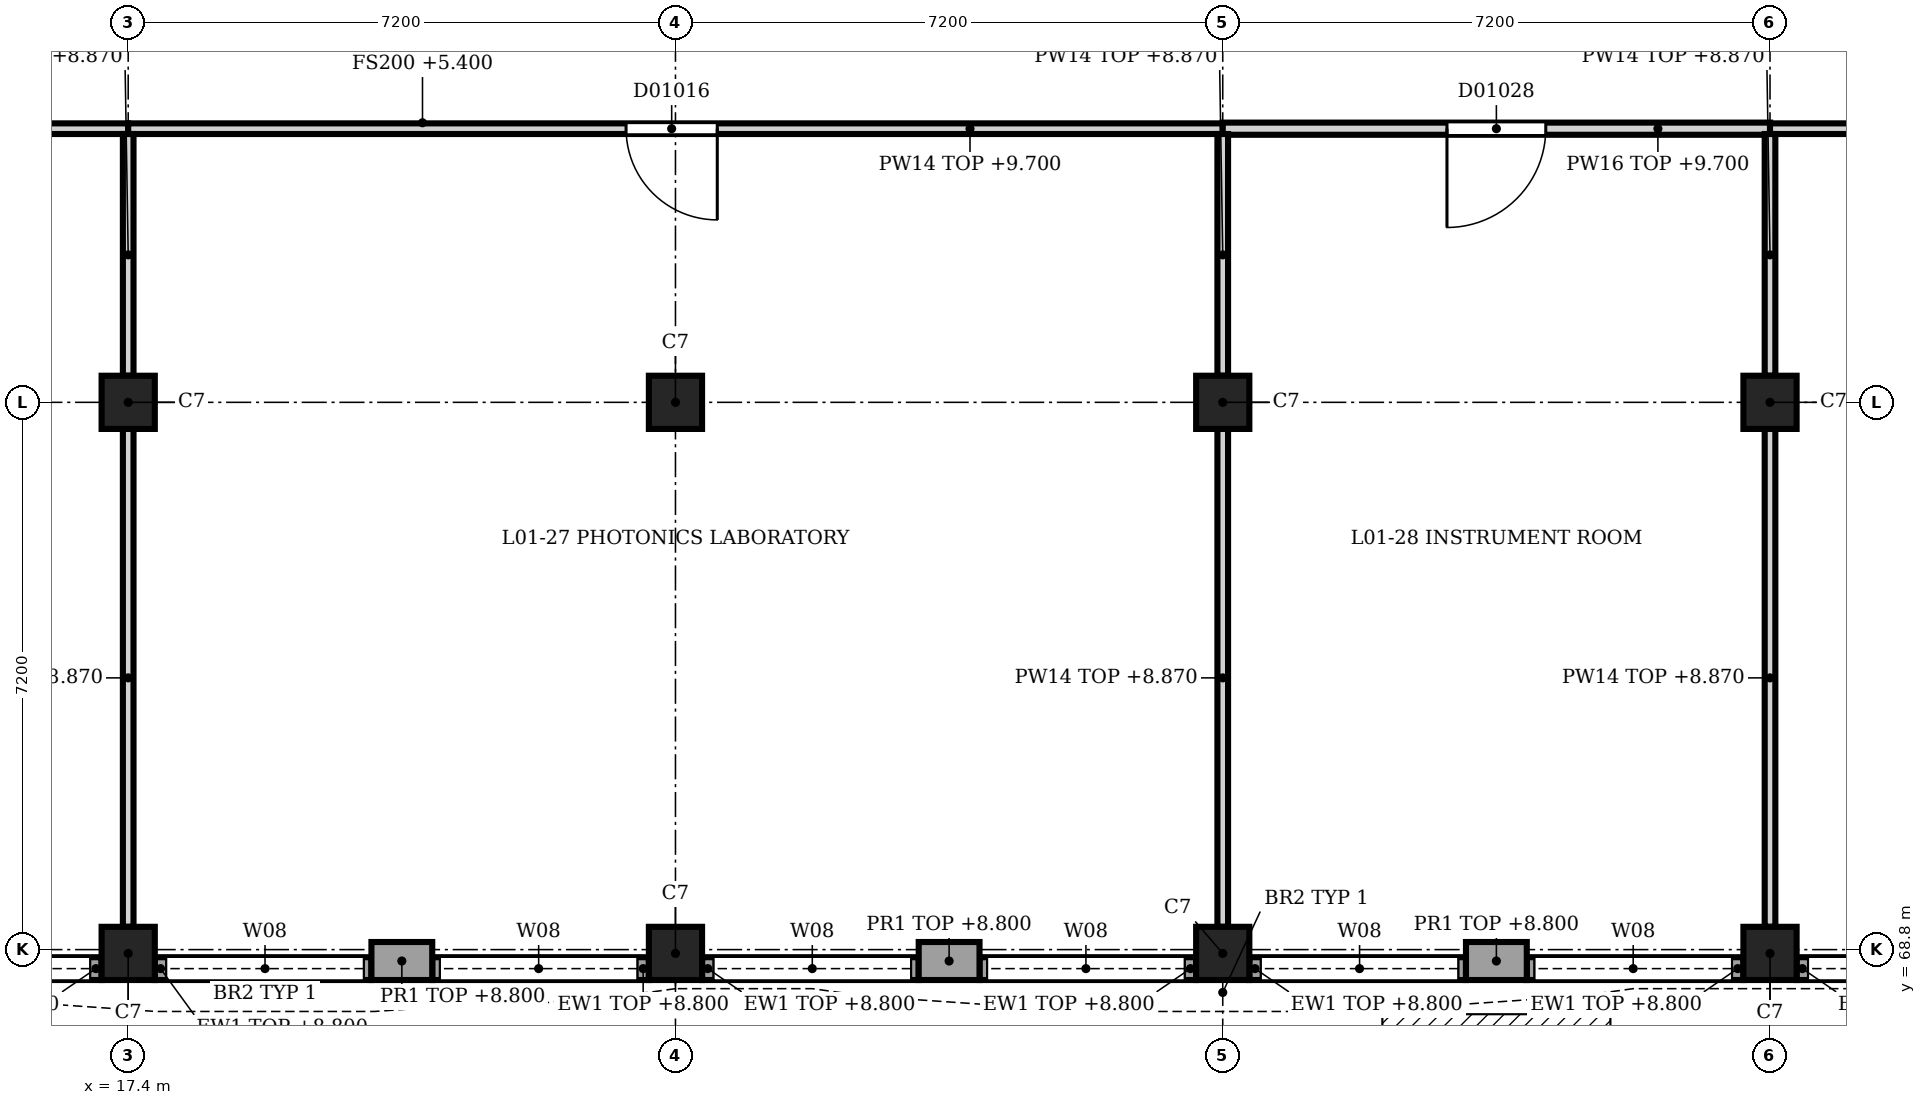
"""IFC4 building model, lengths in metres.
Left out: names, types, materials, properties, quantities, classifications, styles, units other than length and angle.
Written with IfcOpenShell. Run it as: python <this file> out.ifc"""

import sys

from ifc_helpers import new_model, si_unit, direction, frame, frame_2d, origin, origin_2d, place, context, subcontext, project, spatial, rectangle, extrude, element, fill, save


model = new_model("IFC4")
c1 = context("Model", 3, precision=1e-05, world=origin(), true_north=direction((0.0, 1.0)))
c2 = subcontext(c1, "Body", "Model", "MODEL_VIEW")
j1 = project(units=[si_unit("LENGTHUNIT", "METRE"), si_unit("PLANEANGLEUNIT", "RADIAN")], contexts=[c1])
p1 = place(None, origin())
s1 = spatial("IfcSite", under=j1, at=p1, CompositionType="ELEMENT")
p2 = place(p1, origin())
s2 = spatial("IfcBuilding", under=s1, at=p2, CompositionType="ELEMENT")
p3 = place(p2, frame((0.0, 0.0, 5.4)))
s3 = spatial("IfcBuildingStorey", under=s2, at=p3, CompositionType="ELEMENT", Elevation=5.4)
for number, where, z_axis, x_axis in (
    (1, (17.4, 68.75, 0.0), (0.0, 0.0, 1.0), (1.0, 0.0, 0.0)),
    (2, (17.4, 76.0, 0.0), (0.0, 0.0, 1.0), (1.0, 0.0, 0.0)),
    (3, (24.6, 68.75, 0.0), (0.0, 0.0, 1.0), (1.0, 0.0, 0.0)),
    (4, (24.6, 76.0, 0.0), (0.0, 0.0, 1.0), (1.0, 0.0, 0.0)),
    (5, (31.8, 68.75, 0.0), (0.0, 0.0, 1.0), (1.0, 0.0, 0.0)),
    (6, (31.8, 76.0, 0.0), (0.0, 0.0, 1.0), (1.0, 0.0, 0.0)),
    (7, (39.0, 68.75, 0.0), (0.0, 0.0, 1.0), (1.0, 0.0, 0.0)),
    (8, (39.0, 76.0, 0.0), (0.0, 0.0, 1.0), (1.0, 0.0, 0.0)),
):
    element("IfcColumn", number, at=place(p3, frame(where, z_axis=z_axis, x_axis=x_axis)), inside=s3, PredefinedType="COLUMN", context=c2, shape_type="SweptSolid", body=[
        extrude(rectangle(XDim=0.7, YDim=0.7, at=origin_2d()), origin(), (0.0, 0.0, 1.0), 4.5),
    ])
for number, where, z_axis, x_axis in (
    (9, (35.8, 68.65, 0.0), (0.0, 0.0, 1.0), (-1.0, 0.0, 0.0)),
    (10, (28.6, 68.65, 0.0), (0.0, 0.0, 1.0), (-1.0, 0.0, 0.0)),
):
    element("IfcWall", number, at=place(p3, frame(where, z_axis=z_axis, x_axis=x_axis)), inside=s3, PredefinedType="SOLIDWALL", context=c2, shape_type="SweptSolid", body=[
        extrude(rectangle(XDim=0.8, YDim=0.5, at=frame_2d((0.4, 0.0))), origin(), (0.0, 0.0, 1.0), 3.4),
    ])
p4 = place(p3, frame((21.4, 68.65, 0.0), z_axis=(0.0, 0.0, 1.0), x_axis=(-1.0, 0.0, 0.0)))
e11 = element("IfcWall", 11, at=p4, inside=s3, PredefinedType="SOLIDWALL", context=c2, shape_type="SweptSolid", body=[
    extrude(rectangle(XDim=0.8, YDim=0.5, at=frame_2d((0.4, 0.0))), origin(), (0.0, 0.0, 1.0), 3.4),
])
p5 = place(p3, frame((42.2, 68.55, 0.0), z_axis=(0.0, 0.0, 1.0), x_axis=(-1.0, 0.0, 0.0)))
e12 = element("IfcWall", 12, at=p5, inside=s3, PredefinedType="SOLIDWALL", context=c2, shape_type="SweptSolid", body=[
    extrude(rectangle(XDim=2.85, YDim=0.3, at=frame_2d((1.425, 0.0))), origin(), (0.0, 0.0, 1.0), 3.4),
])
p6 = place(p5, frame((0.1, 0.0, 1.2)))
e13 = element("IfcOpeningElement", 13, at=p6, cuts=e12, PredefinedType="OPENING", context=c2, shape_type="SweptSolid", body=[
    extrude(rectangle(XDim=2.6, YDim=2.1, at=frame_2d((1.3, 1.05))), frame((0.0, 0.16, 0.0), z_axis=(0.0, -1.0, 0.0), x_axis=(1.0, 0.0, 0.0)), (0.0, 0.0, 1.0), 0.32),
])
p7 = place(p3, frame((38.65, 68.55, 0.0), z_axis=(0.0, 0.0, 1.0), x_axis=(-1.0, 0.0, 0.0)))
e14 = element("IfcWall", 14, at=p7, inside=s3, PredefinedType="SOLIDWALL", context=c2, shape_type="SweptSolid", body=[
    extrude(rectangle(XDim=2.85, YDim=0.3, at=frame_2d((1.425, 0.0))), origin(), (0.0, 0.0, 1.0), 3.4),
])
p8 = place(p7, frame((0.15, 0.0, 1.2)))
e15 = element("IfcOpeningElement", 15, at=p8, cuts=e14, PredefinedType="OPENING", context=c2, shape_type="SweptSolid", body=[
    extrude(rectangle(XDim=2.6, YDim=2.1, at=frame_2d((1.3, 1.05))), frame((0.0, 0.16, 0.0), z_axis=(0.0, -1.0, 0.0), x_axis=(1.0, 0.0, 0.0)), (0.0, 0.0, 1.0), 0.32),
])
p9 = place(p3, frame((35.0, 68.55, 0.0), z_axis=(0.0, 0.0, 1.0), x_axis=(-1.0, 0.0, 0.0)))
e16 = element("IfcWall", 16, at=p9, inside=s3, PredefinedType="SOLIDWALL", context=c2, shape_type="SweptSolid", body=[
    extrude(rectangle(XDim=2.85, YDim=0.3, at=frame_2d((1.425, 0.0))), origin(), (0.0, 0.0, 1.0), 3.4),
])
p10 = place(p9, frame((0.1, 0.0, 1.2)))
e17 = element("IfcOpeningElement", 17, at=p10, cuts=e16, PredefinedType="OPENING", context=c2, shape_type="SweptSolid", body=[
    extrude(rectangle(XDim=2.6, YDim=2.1, at=frame_2d((1.3, 1.05))), frame((0.0, 0.16, 0.0), z_axis=(0.0, -1.0, 0.0), x_axis=(1.0, 0.0, 0.0)), (0.0, 0.0, 1.0), 0.32),
])
p11 = place(p3, frame((31.45, 68.55, 0.0), z_axis=(0.0, 0.0, 1.0), x_axis=(-1.0, 0.0, 0.0)))
e18 = element("IfcWall", 18, at=p11, inside=s3, PredefinedType="SOLIDWALL", context=c2, shape_type="SweptSolid", body=[
    extrude(rectangle(XDim=2.85, YDim=0.3, at=frame_2d((1.425, 0.0))), origin(), (0.0, 0.0, 1.0), 3.4),
])
p12 = place(p11, frame((0.15, 0.0, 1.2)))
e19 = element("IfcOpeningElement", 19, at=p12, cuts=e18, PredefinedType="OPENING", context=c2, shape_type="SweptSolid", body=[
    extrude(rectangle(XDim=2.6, YDim=2.1, at=frame_2d((1.3, 1.05))), frame((0.0, 0.16, 0.0), z_axis=(0.0, -1.0, 0.0), x_axis=(1.0, 0.0, 0.0)), (0.0, 0.0, 1.0), 0.32),
])
p13 = place(p3, frame((27.8, 68.55, 0.0), z_axis=(0.0, 0.0, 1.0), x_axis=(-1.0, 0.0, 0.0)))
e20 = element("IfcWall", 20, at=p13, inside=s3, PredefinedType="SOLIDWALL", context=c2, shape_type="SweptSolid", body=[
    extrude(rectangle(XDim=2.85, YDim=0.3, at=frame_2d((1.425, 0.0))), origin(), (0.0, 0.0, 1.0), 3.4),
])
p14 = place(p13, frame((0.1, 0.0, 1.2)))
e21 = element("IfcOpeningElement", 21, at=p14, cuts=e20, PredefinedType="OPENING", context=c2, shape_type="SweptSolid", body=[
    extrude(rectangle(XDim=2.6, YDim=2.1, at=frame_2d((1.3, 1.05))), frame((0.0, 0.16, 0.0), z_axis=(0.0, -1.0, 0.0), x_axis=(1.0, 0.0, 0.0)), (0.0, 0.0, 1.0), 0.32),
])
p15 = place(p3, frame((24.25, 68.55, 0.0), z_axis=(0.0, 0.0, 1.0), x_axis=(-1.0, 0.0, 0.0)))
e22 = element("IfcWall", 22, at=p15, inside=s3, PredefinedType="SOLIDWALL", context=c2, shape_type="SweptSolid", body=[
    extrude(rectangle(XDim=2.85, YDim=0.3, at=frame_2d((1.425, 0.0))), origin(), (0.0, 0.0, 1.0), 3.4),
])
p16 = place(p15, frame((0.15, 0.0, 1.2)))
e23 = element("IfcOpeningElement", 23, at=p16, cuts=e22, PredefinedType="OPENING", context=c2, shape_type="SweptSolid", body=[
    extrude(rectangle(XDim=2.6, YDim=2.1, at=frame_2d((1.3, 1.05))), frame((0.0, 0.16, 0.0), z_axis=(0.0, -1.0, 0.0), x_axis=(1.0, 0.0, 0.0)), (0.0, 0.0, 1.0), 0.32),
])
p17 = place(p3, frame((20.6, 68.55, 0.0), z_axis=(0.0, 0.0, 1.0), x_axis=(-1.0, 0.0, 0.0)))
e24 = element("IfcWall", 24, at=p17, inside=s3, PredefinedType="SOLIDWALL", context=c2, shape_type="SweptSolid", body=[
    extrude(rectangle(XDim=2.85, YDim=0.3, at=frame_2d((1.425, 0.0))), origin(), (0.0, 0.0, 1.0), 3.4),
])
p18 = place(p17, frame((0.1, 0.0, 1.2)))
e25 = element("IfcOpeningElement", 25, at=p18, cuts=e24, PredefinedType="OPENING", context=c2, shape_type="SweptSolid", body=[
    extrude(rectangle(XDim=2.6, YDim=2.1, at=frame_2d((1.3, 1.05))), frame((0.0, 0.16, 0.0), z_axis=(0.0, -1.0, 0.0), x_axis=(1.0, 0.0, 0.0)), (0.0, 0.0, 1.0), 0.32),
])
p19 = place(p3, frame((17.05, 68.55, 0.0), z_axis=(0.0, 0.0, 1.0), x_axis=(-1.0, 0.0, 0.0)))
e26 = element("IfcWall", 26, at=p19, inside=s3, PredefinedType="SOLIDWALL", context=c2, shape_type="SweptSolid", body=[
    extrude(rectangle(XDim=2.85, YDim=0.3, at=frame_2d((1.425, 0.0))), origin(), (0.0, 0.0, 1.0), 3.4),
])
p20 = place(p19, frame((0.15, 0.0, 1.2)))
e27 = element("IfcOpeningElement", 27, at=p20, cuts=e26, PredefinedType="OPENING", context=c2, shape_type="SweptSolid", body=[
    extrude(rectangle(XDim=2.6, YDim=2.1, at=frame_2d((1.3, 1.05))), frame((0.0, 0.16, 0.0), z_axis=(0.0, -1.0, 0.0), x_axis=(1.0, 0.0, 0.0)), (0.0, 0.0, 1.0), 0.32),
])
p21 = place(p3, frame((17.4, 79.6, 0.0), z_axis=(0.0, 0.0, 1.0), x_axis=(-1.0, 0.0, 0.0)))
e28 = element("IfcWall", 28, at=p21, inside=s3, PredefinedType="PARTITIONING", context=c2, shape_type="SweptSolid", body=[
    extrude(rectangle(XDim=14.3, YDim=0.14, at=frame_2d((7.15, 0.0))), origin(), (0.0, 0.0, 1.0), 4.3),
])
p22 = place(p21, frame((6.65, 0.0, 0.0)))
e29 = element("IfcOpeningElement", 29, at=p22, cuts=e28, PredefinedType="OPENING", context=c2, shape_type="SweptSolid", body=[
    extrude(rectangle(XDim=1.2, YDim=2.1, at=frame_2d((0.6, 1.05))), frame((0.0, 0.08, 0.0), z_axis=(0.0, -1.0, 0.0), x_axis=(1.0, 0.0, 0.0)), (0.0, 0.0, 1.0), 0.16),
])
p23 = place(p3, frame((31.8, 79.6, 0.0), z_axis=(0.0, 0.0, 1.0), x_axis=(-1.0, 0.0, 0.0)))
e30 = element("IfcWall", 30, at=p23, inside=s3, PredefinedType="PARTITIONING", context=c2, shape_type="SweptSolid", body=[
    extrude(rectangle(XDim=14.4, YDim=0.14, at=frame_2d((7.2, 0.0))), origin(), (0.0, 0.0, 1.0), 4.3),
])
p24 = place(p23, frame((6.65, 0.0, 0.0)))
e31 = element("IfcOpeningElement", 31, at=p24, cuts=e30, PredefinedType="OPENING", context=c2, shape_type="SweptSolid", body=[
    extrude(rectangle(XDim=1.2, YDim=2.1, at=frame_2d((0.6, 1.05))), frame((0.0, 0.08, 0.0), z_axis=(0.0, -1.0, 0.0), x_axis=(1.0, 0.0, 0.0)), (0.0, 0.0, 1.0), 0.16),
])
p25 = place(p3, frame((39.0, 79.6, 0.0), z_axis=(0.0, 0.0, 1.0), x_axis=(-1.0, 0.0, 0.0)))
e32 = element("IfcWall", 32, at=p25, inside=s3, PredefinedType="PARTITIONING", context=c2, shape_type="SweptSolid", body=[
    extrude(rectangle(XDim=7.2, YDim=0.16, at=frame_2d((3.6, 0.0))), origin(), (0.0, 0.0, 1.0), 4.3),
])
p26 = place(p25, frame((2.95, 0.0, 0.0)))
e33 = element("IfcOpeningElement", 33, at=p26, cuts=e32, PredefinedType="OPENING", context=c2, shape_type="SweptSolid", body=[
    extrude(rectangle(XDim=1.3, YDim=2.2, at=frame_2d((0.65, 1.1))), frame((0.0, 0.09, 0.0), z_axis=(0.0, -1.0, 0.0), x_axis=(1.0, 0.0, 0.0)), (0.0, 0.0, 1.0), 0.18),
])
p27 = place(p3, frame((57.0, 79.6, 0.0), z_axis=(0.0, 0.0, 1.0), x_axis=(-1.0, 0.0, 0.0)))
e34 = element("IfcWall", 34, at=p27, inside=s3, PredefinedType="PARTITIONING", context=c2, shape_type="SweptSolid", body=[
    extrude(rectangle(XDim=18.0, YDim=0.14, at=frame_2d((9.0, 0.0))), origin(), (0.0, 0.0, 1.0), 4.3),
])
p28 = place(p27, frame((8.45, 0.0, 0.0)))
e35 = element("IfcOpeningElement", 35, at=p28, cuts=e34, PredefinedType="OPENING", context=c2, shape_type="SweptSolid", body=[
    extrude(rectangle(XDim=1.1, YDim=2.2, at=frame_2d((0.55, 1.1))), frame((0.0, 0.08, 0.0), z_axis=(0.0, -1.0, 0.0), x_axis=(1.0, 0.0, 0.0)), (0.0, 0.0, 1.0), 0.16),
])
p29 = place(p3, frame((17.4, 69.1, 0.0), z_axis=(0.0, 0.0, 1.0), x_axis=(0.0, 1.0, 0.0)))
e36 = element("IfcWall", 36, at=p29, inside=s3, PredefinedType="PARTITIONING", context=c2, shape_type="SweptSolid", body=[
    extrude(rectangle(XDim=6.55, YDim=0.14, at=frame_2d((3.275, 0.0))), origin(), (0.0, 0.0, 1.0), 3.47),
])
p30 = place(p3, frame((17.4, 76.35, 0.0), z_axis=(0.0, 0.0, 1.0), x_axis=(0.0, 1.0, 0.0)))
e37 = element("IfcWall", 37, at=p30, inside=s3, PredefinedType="PARTITIONING", context=c2, shape_type="SweptSolid", body=[
    extrude(rectangle(XDim=3.18, YDim=0.14, at=frame_2d((1.59, 0.0))), origin(), (0.0, 0.0, 1.0), 3.47),
])
p31 = place(p3, frame((31.8, 69.1, 0.0), z_axis=(0.0, 0.0, 1.0), x_axis=(0.0, 1.0, 0.0)))
e38 = element("IfcWall", 38, at=p31, inside=s3, PredefinedType="PARTITIONING", context=c2, shape_type="SweptSolid", body=[
    extrude(rectangle(XDim=6.55, YDim=0.14, at=frame_2d((3.275, 0.0))), origin(), (0.0, 0.0, 1.0), 3.47),
])
p32 = place(p3, frame((31.8, 76.35, 0.0), z_axis=(0.0, 0.0, 1.0), x_axis=(0.0, 1.0, 0.0)))
e39 = element("IfcWall", 39, at=p32, inside=s3, PredefinedType="PARTITIONING", context=c2, shape_type="SweptSolid", body=[
    extrude(rectangle(XDim=3.18, YDim=0.14, at=frame_2d((1.59, 0.0))), origin(), (0.0, 0.0, 1.0), 3.47),
])
p33 = place(p3, frame((39.0, 69.1, 0.0), z_axis=(0.0, 0.0, 1.0), x_axis=(0.0, 1.0, 0.0)))
e40 = element("IfcWall", 40, at=p33, inside=s3, PredefinedType="PARTITIONING", context=c2, shape_type="SweptSolid", body=[
    extrude(rectangle(XDim=6.55, YDim=0.14, at=frame_2d((3.275, 0.0))), origin(), (0.0, 0.0, 1.0), 3.47),
])
p34 = place(p3, frame((39.0, 76.35, 0.0), z_axis=(0.0, 0.0, 1.0), x_axis=(0.0, 1.0, 0.0)))
e41 = element("IfcWall", 41, at=p34, inside=s3, PredefinedType="PARTITIONING", context=c2, shape_type="SweptSolid", body=[
    extrude(rectangle(XDim=3.18, YDim=0.14, at=frame_2d((1.59, 0.0))), origin(), (0.0, 0.0, 1.0), 3.47),
])
p35 = place(p6, origin())
e42 = element("IfcWindow", 42, at=p35, inside=s3, PartitioningType="SINGLE_PANEL", PredefinedType="WINDOW", context=c2, shape_type="SweptSolid", body=[
    extrude(rectangle(XDim=2.6, YDim=2.1, at=frame_2d((1.3, 1.05))), frame((0.0, 0.03, 0.0), z_axis=(0.0, -1.0, 0.0), x_axis=(1.0, 0.0, 0.0)), (0.0, 0.0, 1.0), 0.06),
])
fill(e13, e42)
p36 = place(p8, origin())
e43 = element("IfcWindow", 43, at=p36, inside=s3, PartitioningType="SINGLE_PANEL", PredefinedType="WINDOW", context=c2, shape_type="SweptSolid", body=[
    extrude(rectangle(XDim=2.6, YDim=2.1, at=frame_2d((1.3, 1.05))), frame((0.0, 0.03, 0.0), z_axis=(0.0, -1.0, 0.0), x_axis=(1.0, 0.0, 0.0)), (0.0, 0.0, 1.0), 0.06),
])
fill(e15, e43)
p37 = place(p10, origin())
e44 = element("IfcWindow", 44, at=p37, inside=s3, PartitioningType="SINGLE_PANEL", PredefinedType="WINDOW", context=c2, shape_type="SweptSolid", body=[
    extrude(rectangle(XDim=2.6, YDim=2.1, at=frame_2d((1.3, 1.05))), frame((0.0, 0.03, 0.0), z_axis=(0.0, -1.0, 0.0), x_axis=(1.0, 0.0, 0.0)), (0.0, 0.0, 1.0), 0.06),
])
fill(e17, e44)
p38 = place(p12, origin())
e45 = element("IfcWindow", 45, at=p38, inside=s3, PartitioningType="SINGLE_PANEL", PredefinedType="WINDOW", context=c2, shape_type="SweptSolid", body=[
    extrude(rectangle(XDim=2.6, YDim=2.1, at=frame_2d((1.3, 1.05))), frame((0.0, 0.03, 0.0), z_axis=(0.0, -1.0, 0.0), x_axis=(1.0, 0.0, 0.0)), (0.0, 0.0, 1.0), 0.06),
])
fill(e19, e45)
p39 = place(p14, origin())
e46 = element("IfcWindow", 46, at=p39, inside=s3, PartitioningType="SINGLE_PANEL", PredefinedType="WINDOW", context=c2, shape_type="SweptSolid", body=[
    extrude(rectangle(XDim=2.6, YDim=2.1, at=frame_2d((1.3, 1.05))), frame((0.0, 0.03, 0.0), z_axis=(0.0, -1.0, 0.0), x_axis=(1.0, 0.0, 0.0)), (0.0, 0.0, 1.0), 0.06),
])
fill(e21, e46)
p40 = place(p16, origin())
e47 = element("IfcWindow", 47, at=p40, inside=s3, PartitioningType="SINGLE_PANEL", PredefinedType="WINDOW", context=c2, shape_type="SweptSolid", body=[
    extrude(rectangle(XDim=2.6, YDim=2.1, at=frame_2d((1.3, 1.05))), frame((0.0, 0.03, 0.0), z_axis=(0.0, -1.0, 0.0), x_axis=(1.0, 0.0, 0.0)), (0.0, 0.0, 1.0), 0.06),
])
fill(e23, e47)
p41 = place(p18, origin())
e48 = element("IfcWindow", 48, at=p41, inside=s3, PartitioningType="SINGLE_PANEL", PredefinedType="WINDOW", context=c2, shape_type="SweptSolid", body=[
    extrude(rectangle(XDim=2.6, YDim=2.1, at=frame_2d((1.3, 1.05))), frame((0.0, 0.03, 0.0), z_axis=(0.0, -1.0, 0.0), x_axis=(1.0, 0.0, 0.0)), (0.0, 0.0, 1.0), 0.06),
])
fill(e25, e48)
p42 = place(p20, origin())
e49 = element("IfcWindow", 49, at=p42, inside=s3, PartitioningType="SINGLE_PANEL", PredefinedType="WINDOW", context=c2, shape_type="SweptSolid", body=[
    extrude(rectangle(XDim=2.6, YDim=2.1, at=frame_2d((1.3, 1.05))), frame((0.0, 0.03, 0.0), z_axis=(0.0, -1.0, 0.0), x_axis=(1.0, 0.0, 0.0)), (0.0, 0.0, 1.0), 0.06),
])
fill(e27, e49)
p43 = place(p24, origin())
e50 = element("IfcDoor", 50, at=p43, inside=s3, OperationType="SINGLE_SWING_RIGHT", PredefinedType="DOOR", context=c2, shape_type="SweptSolid", body=[
    extrude(rectangle(XDim=1.2, YDim=2.1, at=frame_2d((0.6, 1.05))), frame((0.0, 0.025, 0.0), z_axis=(0.0, -1.0, 0.0), x_axis=(1.0, 0.0, 0.0)), (0.0, 0.0, 1.0), 0.05),
])
fill(e31, e50)
p44 = place(p26, origin())
e51 = element("IfcDoor", 51, at=p44, inside=s3, OperationType="SINGLE_SWING_RIGHT", PredefinedType="DOOR", context=c2, shape_type="SweptSolid", body=[
    extrude(rectangle(XDim=1.3, YDim=2.2, at=frame_2d((0.65, 1.1))), frame((0.0, 0.025, 0.0), z_axis=(0.0, -1.0, 0.0), x_axis=(1.0, 0.0, 0.0)), (0.0, 0.0, 1.0), 0.05),
])
fill(e33, e51)
save(model, sys.argv[1])
